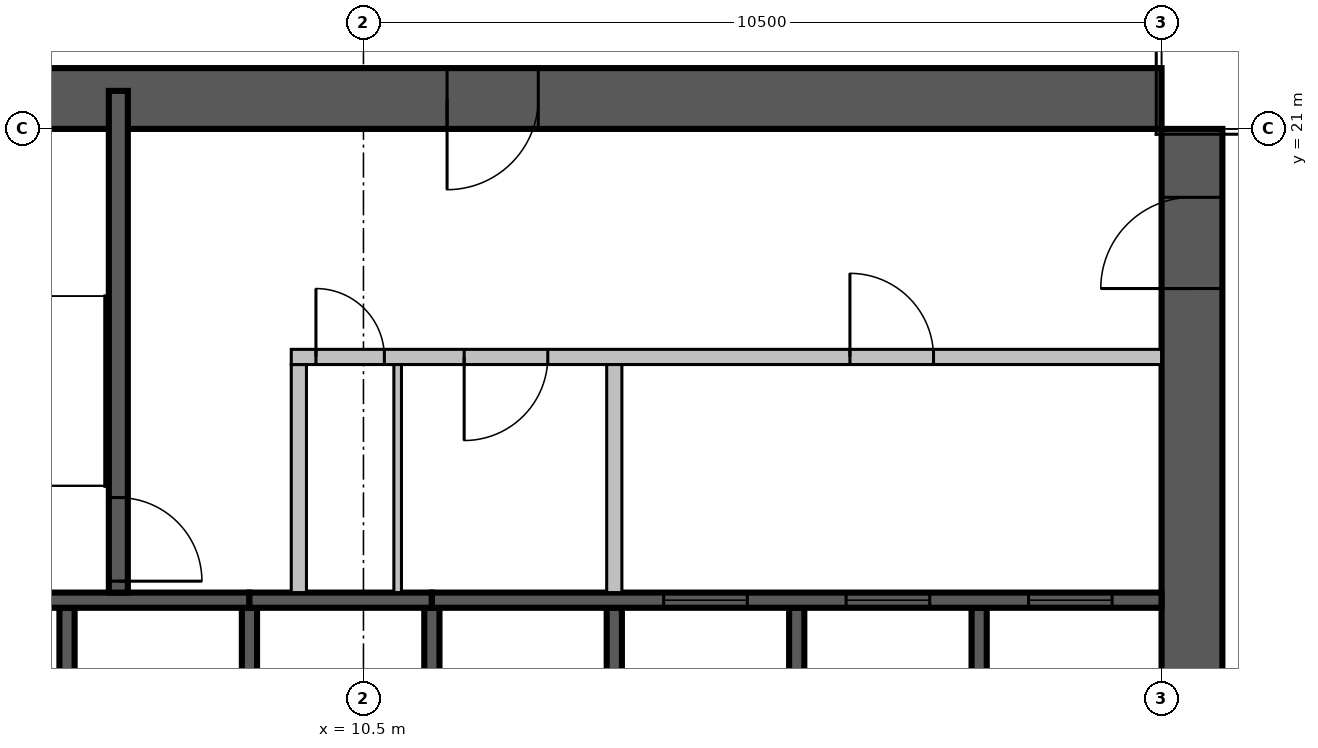
"""IFC4 building model, lengths in metres.
Left out: names, types, materials, properties, quantities, classifications, styles, units other than length and angle.
Written with IfcOpenShell. Run it as: python <this file> out.ifc"""

import sys

from ifc_helpers import new_model, si_unit, direction, frame, frame_2d, origin, place, context, subcontext, project, spatial, rectangle, extrude, source, transform, mapped, element, fill, save


model = new_model("IFC4")
c1 = context("Model", 3, precision=1e-05, world=origin(), true_north=direction((0.0, 1.0)))
c2 = subcontext(c1, "Body", "Model", "MODEL_VIEW")
j1 = project(units=[si_unit("LENGTHUNIT", "METRE"), si_unit("PLANEANGLEUNIT", "RADIAN")], contexts=[c1])
p1 = place(None, origin())
s1 = spatial("IfcSite", under=j1, at=p1, CompositionType="ELEMENT")
p2 = place(p1, origin())
s2 = spatial("IfcBuilding", under=s1, at=p2, CompositionType="ELEMENT")
p3 = place(p2, frame((0.0, 0.0, 269.0)))
s3 = spatial("IfcBuildingStorey", under=s2, at=p3, CompositionType="ELEMENT", Elevation=269.0)
p4 = place(p3, frame((21.4, 4.2, 0.0), z_axis=(0.0, 0.0, 1.0), x_axis=(0.0, 1.0, 0.0)))
e1 = element("IfcWall", 1, at=p4, inside=s3, PredefinedType="SHEAR", context=c2, shape_type="SweptSolid", body=[
    extrude(rectangle(XDim=16.8, YDim=0.8, at=frame_2d((8.4, 0.0))), origin(), (0.0, 0.0, 1.0), 8.0),
])
m1 = source(origin(), c2, "Body", "SweptSolid", [
    extrude(rectangle(XDim=2.2, YDim=2.1, at=frame_2d((1.1, 1.05))), frame((0.0, 0.41, 0.0), z_axis=(0.0, -1.0, 0.0), x_axis=(1.0, 0.0, 0.0)), (0.0, 0.0, 1.0), 0.82),
])
p5 = place(p4, frame((3.7, 0.0, 0.0)))
e2 = element("IfcOpeningElement", 2, at=p5, cuts=e1, PredefinedType="OPENING", context=c2, shape_type="MappedRepresentation", body=[
    mapped(m1, transform((0.0, 0.0, 0.0), scale=1.0)),
])
m2 = source(origin(), c2, "Body", "SweptSolid", [
    extrude(rectangle(XDim=1.2, YDim=2.1, at=frame_2d((0.6, 1.05))), frame((0.0, 0.41, 0.0), z_axis=(0.0, -1.0, 0.0), x_axis=(1.0, 0.0, 0.0)), (0.0, 0.0, 1.0), 0.82),
])
p6 = place(p4, frame((14.7, 0.0, 0.0)))
e3 = element("IfcOpeningElement", 3, at=p6, cuts=e1, PredefinedType="OPENING", context=c2, shape_type="MappedRepresentation", body=[
    mapped(m2, transform((0.0, 0.0, 0.0), scale=1.0)),
])
m3 = source(origin(), c2, "Body", "SweptSolid", [
    extrude(rectangle(XDim=16.8, YDim=0.8, at=frame_2d((8.4, 0.0))), origin(), (0.0, 0.0, 1.0), 8.0),
])
p7 = place(p3, frame((4.2, 21.4, 0.0), z_axis=(0.0, 0.0, 1.0), x_axis=(1.0, 0.0, 0.0)))
e4 = element("IfcWall", 4, at=p7, inside=s3, PredefinedType="SHEAR", context=c2, shape_type="MappedRepresentation", body=[
    mapped(m3, transform((0.0, 0.0, 0.0), scale=1.0)),
])
p8 = place(p7, frame((7.4, 0.0, 0.0)))
e5 = element("IfcOpeningElement", 5, at=p8, cuts=e4, PredefinedType="OPENING", context=c2, shape_type="MappedRepresentation", body=[
    mapped(m2, transform((0.0, 0.0, 0.0), scale=1.0)),
])
m4 = source(origin(), c2, "Body", "SweptSolid", [
    extrude(rectangle(XDim=3.0, YDim=0.2, at=frame_2d((1.5, 0.0))), origin(), (0.0, 0.0, 1.0), 8.0),
])
p9 = place(p3, frame((6.6, 11.7, 0.0), z_axis=(0.0, 0.0, 1.0), x_axis=(0.0, 1.0, 0.0)))
e6 = element("IfcWall", 6, at=p9, inside=s3, PredefinedType="SOLIDWALL", context=c2, shape_type="MappedRepresentation", body=[
    mapped(m4, transform((0.0, 0.0, 0.0), scale=1.0)),
])
m5 = source(origin(), c2, "Body", "SweptSolid", [
    extrude(rectangle(XDim=3.0, YDim=0.2, at=frame_2d((1.5, 0.0))), origin(), (0.0, 0.0, 1.0), 7.6),
])
for number, where, z_axis, x_axis in (
    (7, (9.0, 11.7, 0.0), (0.0, 0.0, 1.0), (0.0, 1.0, 0.0)),
    (8, (11.4, 11.7, 0.0), (0.0, 0.0, 1.0), (0.0, 1.0, 0.0)),
):
    element("IfcWall", number, at=place(p3, frame(where, z_axis=z_axis, x_axis=x_axis)), inside=s3, PredefinedType="SOLIDWALL", context=c2, shape_type="MappedRepresentation", body=[
        mapped(m5, transform((0.0, 0.0, 0.0), scale=1.0)),
    ])
for number, where, z_axis, x_axis in (
    (9, (13.8, 11.7, 0.0), (0.0, 0.0, 1.0), (0.0, 1.0, 0.0)),
    (10, (16.2, 11.7, 0.0), (0.0, 0.0, 1.0), (0.0, 1.0, 0.0)),
    (11, (18.6, 11.7, 0.0), (0.0, 0.0, 1.0), (0.0, 1.0, 0.0)),
):
    element("IfcWall", number, at=place(p3, frame(where, z_axis=z_axis, x_axis=x_axis)), inside=s3, PredefinedType="SOLIDWALL", context=c2, shape_type="MappedRepresentation", body=[
        mapped(m4, transform((0.0, 0.0, 0.0), scale=1.0)),
    ])
m6 = source(origin(), c2, "Body", "SweptSolid", [
    extrude(rectangle(XDim=4.8, YDim=0.2, at=frame_2d((2.4, 0.0))), origin(), (0.0, 0.0, 1.0), 8.0),
])
p10 = place(p3, frame((4.2, 14.8, 0.0), z_axis=(0.0, 0.0, 1.0), x_axis=(1.0, 0.0, 0.0)))
e12 = element("IfcWall", 12, at=p10, inside=s3, PredefinedType="SOLIDWALL", context=c2, shape_type="MappedRepresentation", body=[
    mapped(m6, transform((0.0, 0.0, 0.0), scale=1.0)),
])
m7 = source(origin(), c2, "Body", "SweptSolid", [
    extrude(rectangle(XDim=2.4, YDim=0.2, at=frame_2d((1.2, 0.0))), origin(), (0.0, 0.0, 1.0), 7.6),
])
p11 = place(p3, frame((9.0, 14.8, 0.0), z_axis=(0.0, 0.0, 1.0), x_axis=(1.0, 0.0, 0.0)))
e13 = element("IfcWall", 13, at=p11, inside=s3, PredefinedType="SOLIDWALL", context=c2, shape_type="MappedRepresentation", body=[
    mapped(m7, transform((0.0, 0.0, 0.0), scale=1.0)),
])
m8 = source(origin(), c2, "Body", "SweptSolid", [
    extrude(rectangle(XDim=9.6, YDim=0.2, at=frame_2d((4.8, 0.0))), origin(), (0.0, 0.0, 1.0), 8.0),
])
p12 = place(p3, frame((11.4, 14.8, 0.0), z_axis=(0.0, 0.0, 1.0), x_axis=(1.0, 0.0, 0.0)))
e14 = element("IfcWall", 14, at=p12, inside=s3, PredefinedType="SOLIDWALL", context=c2, shape_type="MappedRepresentation", body=[
    mapped(m8, transform((0.0, 0.0, 0.0), scale=1.0)),
])
m9 = source(origin(), c2, "Body", "SweptSolid", [
    extrude(rectangle(XDim=1.1, YDim=2.1, at=frame_2d((0.55, 1.05))), frame((0.0, 0.11, 0.0), z_axis=(0.0, -1.0, 0.0), x_axis=(1.0, 0.0, 0.0)), (0.0, 0.0, 1.0), 0.22),
])
p13 = place(p12, frame((3.05, 0.0, 0.0)))
e15 = element("IfcOpeningElement", 15, at=p13, cuts=e14, PredefinedType="OPENING", context=c2, shape_type="MappedRepresentation", body=[
    mapped(m9, transform((0.0, 0.0, 0.0), scale=1.0)),
])
p14 = place(p12, frame((5.45, 0.0, 0.0)))
e16 = element("IfcOpeningElement", 16, at=p14, cuts=e14, PredefinedType="OPENING", context=c2, shape_type="MappedRepresentation", body=[
    mapped(m9, transform((0.0, 0.0, 0.0), scale=1.0)),
])
p15 = place(p12, frame((7.85, 0.0, 0.0)))
e17 = element("IfcOpeningElement", 17, at=p15, cuts=e14, PredefinedType="OPENING", context=c2, shape_type="MappedRepresentation", body=[
    mapped(m9, transform((0.0, 0.0, 0.0), scale=1.0)),
])
m10 = source(origin(), c2, "Body", "SweptSolid", [
    extrude(rectangle(XDim=6.6, YDim=0.25, at=frame_2d((3.3, 0.0))), origin(), (0.0, 0.0, 1.0), 7.6),
])
p16 = place(p3, frame((7.275, 14.9, 0.0), z_axis=(0.0, 0.0, 1.0), x_axis=(0.0, 1.0, 0.0)))
e18 = element("IfcWall", 18, at=p16, inside=s3, PredefinedType="SOLIDWALL", context=c2, shape_type="MappedRepresentation", body=[
    mapped(m10, transform((0.0, 0.0, 0.0), scale=1.0)),
])
m11 = source(origin(), c2, "Body", "SweptSolid", [
    extrude(rectangle(XDim=1.1, YDim=2.1, at=frame_2d((0.55, 1.05))), frame((0.0, 0.135, 0.0), z_axis=(0.0, -1.0, 0.0), x_axis=(1.0, 0.0, 0.0)), (0.0, 0.0, 1.0), 0.27),
])
p17 = place(p16, frame((0.15, 0.0, 0.0)))
e19 = element("IfcOpeningElement", 19, at=p17, cuts=e18, PredefinedType="OPENING", context=c2, shape_type="MappedRepresentation", body=[
    mapped(m11, transform((0.0, 0.0, 0.0), scale=1.0)),
])
m12 = source(origin(), c2, "Body", "SweptSolid", [
    extrude(rectangle(XDim=3.0, YDim=0.2, at=frame_2d((1.5, 0.0))), origin(), (0.0, 0.0, 1.0), 7.6),
])
p18 = place(p3, frame((9.65, 14.9, 0.0), z_axis=(0.0, 0.0, 1.0), x_axis=(0.0, 1.0, 0.0)))
e20 = element("IfcWall", 20, at=p18, inside=s3, PredefinedType="PARTITIONING", context=c2, shape_type="MappedRepresentation", body=[
    mapped(m12, transform((0.0, 0.0, 0.0), scale=1.0)),
])
m13 = source(origin(), c2, "Body", "SweptSolid", [
    extrude(rectangle(XDim=11.45, YDim=0.2, at=frame_2d((5.725, 0.0))), origin(), (0.0, 0.0, 1.0), 7.6),
])
p19 = place(p3, frame((9.55, 18.0, 0.0), z_axis=(0.0, 0.0, 1.0), x_axis=(1.0, 0.0, 0.0)))
e21 = element("IfcWall", 21, at=p19, inside=s3, PredefinedType="PARTITIONING", context=c2, shape_type="MappedRepresentation", body=[
    mapped(m13, transform((0.0, 0.0, 0.0), scale=1.0)),
])
m14 = source(origin(), c2, "Body", "SweptSolid", [
    extrude(rectangle(XDim=0.9, YDim=2.1, at=frame_2d((0.45, 1.05))), frame((0.0, 0.11, 0.0), z_axis=(0.0, -1.0, 0.0), x_axis=(1.0, 0.0, 0.0)), (0.0, 0.0, 1.0), 0.22),
])
p20 = place(p19, frame((0.325, 0.0, 0.0)))
e22 = element("IfcOpeningElement", 22, at=p20, cuts=e21, PredefinedType="OPENING", context=c2, shape_type="MappedRepresentation", body=[
    mapped(m14, transform((0.0, 0.0, 0.0), scale=1.0)),
])
p21 = place(p19, frame((2.275, 0.0, 0.0)))
e23 = element("IfcOpeningElement", 23, at=p21, cuts=e21, PredefinedType="OPENING", context=c2, shape_type="MappedRepresentation", body=[
    mapped(m9, transform((0.0, 0.0, 0.0), scale=1.0)),
])
p22 = place(p19, frame((7.35, 0.0, 0.0)))
e24 = element("IfcOpeningElement", 24, at=p22, cuts=e21, PredefinedType="OPENING", context=c2, shape_type="MappedRepresentation", body=[
    mapped(m9, transform((0.0, 0.0, 0.0), scale=1.0)),
])
p23 = place(p3, frame((13.8, 14.9, 0.0), z_axis=(0.0, 0.0, 1.0), x_axis=(0.0, 1.0, 0.0)))
e25 = element("IfcWall", 25, at=p23, inside=s3, PredefinedType="PARTITIONING", context=c2, shape_type="MappedRepresentation", body=[
    mapped(m12, transform((0.0, 0.0, 0.0), scale=1.0)),
])
m15 = source(origin(), c2, "Body", "SweptSolid", [
    extrude(rectangle(XDim=3.0, YDim=0.1, at=frame_2d((1.5, 0.0))), origin(), (0.0, 0.0, 1.0), 7.6),
])
p24 = place(p3, frame((10.95, 14.9, 0.0), z_axis=(0.0, 0.0, 1.0), x_axis=(0.0, 1.0, 0.0)))
e26 = element("IfcWall", 26, at=p24, inside=s3, PredefinedType="PARTITIONING", context=c2, shape_type="MappedRepresentation", body=[
    mapped(m15, transform((0.0, 0.0, 0.0), scale=1.0)),
])
m16 = source(origin(), c2, "Body", "SweptSolid", [
    extrude(rectangle(XDim=1.1, YDim=2.1, at=frame_2d((0.55, 1.05))), frame((0.0, 0.025, 0.0), z_axis=(0.0, -1.0, 0.0), x_axis=(1.0, 0.0, 0.0)), (0.0, 0.0, 1.0), 0.05),
])
p25 = place(p13, origin())
e27 = element("IfcDoor", 27, at=p25, inside=s3, OperationType="SLIDING_TO_LEFT", PredefinedType="DOOR", context=c2, shape_type="MappedRepresentation", body=[
    mapped(m16, transform((0.0, 0.0, 0.0), scale=1.0)),
])
fill(e15, e27)
p26 = place(p14, origin())
e28 = element("IfcDoor", 28, at=p26, inside=s3, OperationType="SLIDING_TO_LEFT", PredefinedType="DOOR", context=c2, shape_type="MappedRepresentation", body=[
    mapped(m16, transform((0.0, 0.0, 0.0), scale=1.0)),
])
fill(e16, e28)
p27 = place(p15, origin())
e29 = element("IfcDoor", 29, at=p27, inside=s3, OperationType="SLIDING_TO_LEFT", PredefinedType="DOOR", context=c2, shape_type="MappedRepresentation", body=[
    mapped(m16, transform((0.0, 0.0, 0.0), scale=1.0)),
])
fill(e17, e29)
p28 = place(p17, origin())
e30 = element("IfcDoor", 30, at=p28, inside=s3, OperationType="SINGLE_SWING_RIGHT", PredefinedType="DOOR", context=c2, shape_type="MappedRepresentation", body=[
    mapped(m16, transform((0.0, 0.0, 0.0), scale=1.0)),
])
fill(e19, e30)
m17 = source(origin(), c2, "Body", "SweptSolid", [
    extrude(rectangle(XDim=0.9, YDim=2.1, at=frame_2d((0.45, 1.05))), frame((0.0, 0.025, 0.0), z_axis=(0.0, -1.0, 0.0), x_axis=(1.0, 0.0, 0.0)), (0.0, 0.0, 1.0), 0.05),
])
p29 = place(p20, origin())
e31 = element("IfcDoor", 31, at=p29, inside=s3, OperationType="SINGLE_SWING_LEFT", PredefinedType="DOOR", context=c2, shape_type="MappedRepresentation", body=[
    mapped(m17, transform((0.0, 0.0, 0.0), scale=1.0)),
])
fill(e22, e31)
p30 = place(p21, origin())
e32 = element("IfcDoor", 32, at=p30, inside=s3, OperationType="SINGLE_SWING_RIGHT", PredefinedType="DOOR", context=c2, shape_type="MappedRepresentation", body=[
    mapped(m16, transform((0.0, 0.0, 0.0), scale=1.0)),
])
fill(e23, e32)
p31 = place(p22, origin())
e33 = element("IfcDoor", 33, at=p31, inside=s3, OperationType="SINGLE_SWING_LEFT", PredefinedType="DOOR", context=c2, shape_type="MappedRepresentation", body=[
    mapped(m16, transform((0.0, 0.0, 0.0), scale=1.0)),
])
fill(e24, e33)
m18 = source(origin(), c2, "Body", "SweptSolid", [
    extrude(rectangle(XDim=1.2, YDim=2.1, at=frame_2d((0.6, 1.05))), frame((0.0, 0.025, 0.0), z_axis=(0.0, -1.0, 0.0), x_axis=(1.0, 0.0, 0.0)), (0.0, 0.0, 1.0), 0.05),
])
p32 = place(p8, origin())
e34 = element("IfcDoor", 34, at=p32, inside=s3, OperationType="SINGLE_SWING_RIGHT", PredefinedType="DOOR", context=c2, shape_type="MappedRepresentation", body=[
    mapped(m18, transform((0.0, 0.0, 0.0), scale=1.0)),
])
fill(e5, e34)
p33 = place(p6, origin())
e35 = element("IfcDoor", 35, at=p33, inside=s3, OperationType="SINGLE_SWING_LEFT", PredefinedType="DOOR", context=c2, shape_type="MappedRepresentation", body=[
    mapped(m18, transform((0.0, 0.0, 0.0), scale=1.0)),
])
fill(e3, e35)
save(model, sys.argv[1])
